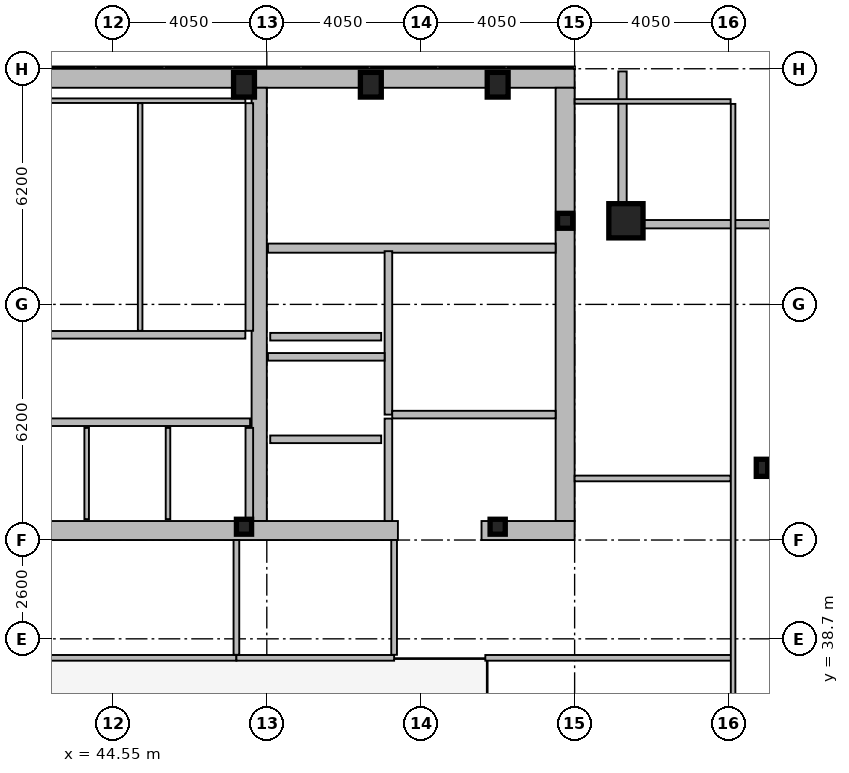
"""IFC4 building model, lengths in metres.
Left out: names, types, materials, properties, quantities, classifications, styles, units other than length and angle.
Written with IfcOpenShell. Run it as: python <this file> out.ifc"""

import sys

from ifc_helpers import new_model, si_unit, direction, frame, frame_2d, origin, origin_2d, place, context, subcontext, project, spatial, rectangle, hollow_rectangle, i_section, extrude, element, fill, save


model = new_model("IFC4")
c1 = context("Model", 3, precision=1e-05, world=origin(), true_north=direction((0.0, 1.0)))
c2 = subcontext(c1, "Body", "Model", "MODEL_VIEW")
j1 = project(units=[si_unit("LENGTHUNIT", "METRE"), si_unit("PLANEANGLEUNIT", "RADIAN")], contexts=[c1])
p1 = place(None, origin())
s1 = spatial("IfcSite", under=j1, at=p1, CompositionType="ELEMENT")
p2 = place(p1, origin())
s2 = spatial("IfcBuilding", under=s1, at=p2, CompositionType="ELEMENT")
p3 = place(p2, frame((0.0, 0.0, 329.0)))
s3 = spatial("IfcBuildingStorey", under=s2, at=p3, CompositionType="ELEMENT", Elevation=329.0)
p4 = place(p3, frame((16.2, 53.45, 0.0), z_axis=(0.0, 0.0, 1.0), x_axis=(1.0, 0.0, 0.0)))
e1 = element("IfcWall", 1, at=p4, inside=s3, PredefinedType="SHEAR", context=c2, shape_type="SweptSolid", body=[
    extrude(rectangle(XDim=40.5, YDim=0.5, at=frame_2d((20.25, 0.0))), origin(), (0.0, 0.0, 1.0), 3.44),
])
p5 = place(p3, frame((56.45, 53.2, 0.0), z_axis=(0.0, 0.0, 1.0), x_axis=(0.0, -1.0, 0.0)))
e2 = element("IfcWall", 2, at=p5, inside=s3, PredefinedType="SHEAR", context=c2, shape_type="SweptSolid", body=[
    extrude(rectangle(XDim=11.4, YDim=0.5, at=frame_2d((5.7, 0.0))), origin(), (0.0, 0.0, 1.0), 3.44),
])
p6 = place(p3, frame((48.4, 41.8, 0.0), z_axis=(0.0, 0.0, 1.0), x_axis=(0.0, 1.0, 0.0)))
e3 = element("IfcWall", 3, at=p6, inside=s3, PredefinedType="SHEAR", context=c2, shape_type="SweptSolid", body=[
    extrude(rectangle(XDim=11.4, YDim=0.4, at=frame_2d((5.7, 0.0))), origin(), (0.0, 0.0, 1.0), 3.44),
])
p7 = place(p3, frame((52.05, 41.55, 0.0), z_axis=(0.0, 0.0, 1.0), x_axis=(-1.0, 0.0, 0.0)))
e4 = element("IfcWall", 4, at=p7, inside=s3, PredefinedType="SHEAR", context=c2, shape_type="SweptSolid", body=[
    extrude(rectangle(XDim=11.3, YDim=0.5, at=frame_2d((5.65, 0.0))), origin(), (0.0, 0.0, 1.0), 3.44),
])
p8 = place(p3, frame((56.7, 41.55, 0.0), z_axis=(0.0, 0.0, 1.0), x_axis=(-1.0, 0.0, 0.0)))
e5 = element("IfcWall", 5, at=p8, inside=s3, PredefinedType="SHEAR", context=c2, shape_type="SweptSolid", body=[
    extrude(rectangle(XDim=2.45, YDim=0.5, at=frame_2d((1.225, 0.0))), origin(), (0.0, 0.0, 1.0), 3.44),
])
p9 = place(p3, frame((48.63, 48.98, 0.0), z_axis=(0.0, 0.0, 1.0), x_axis=(1.0, 0.0, 0.0)))
e6 = element("IfcWall", 6, at=p9, inside=s3, PredefinedType="SHEAR", context=c2, shape_type="SweptSolid", body=[
    extrude(rectangle(XDim=7.57, YDim=0.24, at=frame_2d((3.785, 0.0))), origin(), (0.0, 0.0, 1.0), 3.44),
])
p10 = place(p9, frame((6.3, 0.0, 0.0)))
e7 = element("IfcOpeningElement", 7, at=p10, cuts=e6, PredefinedType="OPENING", context=c2, shape_type="SweptSolid", body=[
    extrude(rectangle(XDim=1.05, YDim=2.15, at=frame_2d((0.525, 1.075))), frame((0.0, 0.13, 0.0), z_axis=(0.0, -1.0, 0.0), x_axis=(1.0, 0.0, 0.0)), (0.0, 0.0, 1.0), 0.26),
])
p11 = place(p3, frame((58.05, 49.7, 0.0), z_axis=(0.0, 0.0, 1.0), x_axis=(1.0, 0.0, 0.0)))
e8 = element("IfcColumn", 8, at=p11, inside=s3, PredefinedType="COLUMN", context=c2, shape_type="SweptSolid", body=[
    extrude(hollow_rectangle(XDim=0.9, YDim=0.9, WallThickness=0.05, at=origin_2d()), origin(), (0.0, 0.0, 1.0), 3.6),
])
for number, where, z_axis, x_axis in (
    (9, (48.0, 53.28, 0.0), (0.0, 0.0, 1.0), (1.0, 0.0, 0.0)),
    (10, (51.337, 53.28, 0.0), (0.0, 0.0, 1.0), (1.0, 0.0, 0.0)),
    (11, (54.675, 53.28, 0.0), (0.0, 0.0, 1.0), (1.0, 0.0, 0.0)),
):
    element("IfcColumn", number, at=place(p3, frame(where, z_axis=z_axis, x_axis=x_axis)), inside=s3, PredefinedType="COLUMN", context=c2, shape_type="SweptSolid", body=[
        extrude(hollow_rectangle(XDim=0.55, YDim=0.65, WallThickness=0.04, at=origin_2d()), origin(), (0.0, 0.0, 1.0), 3.6),
    ])
p12 = place(p3, frame((61.63, 43.2, 0.0), z_axis=(0.0, 0.0, 1.0), x_axis=(1.0, 0.0, 0.0)))
e12 = element("IfcColumn", 12, at=p12, inside=s3, PredefinedType="COLUMN", context=c2, shape_type="SweptSolid", body=[
    extrude(i_section(OverallWidth=0.3, OverallDepth=0.45, WebThickness=0.014, FlangeThickness=0.026, at=origin_2d()), origin(), (0.0, 0.0, 1.0), 3.6),
])
for number, where, z_axis, x_axis in (
    (13, (56.45, 49.7, 0.0), (0.0, 0.0, 1.0), (1.0, 0.0, 0.0)),
    (14, (48.0, 41.65, 0.0), (0.0, 0.0, 1.0), (1.0, 0.0, 0.0)),
    (15, (54.675, 41.65, 0.0), (0.0, 0.0, 1.0), (1.0, 0.0, 0.0)),
):
    element("IfcColumn", number, at=place(p3, frame(where, z_axis=z_axis, x_axis=x_axis)), inside=s3, PredefinedType="COLUMN", context=c2, shape_type="SweptSolid", body=[
        extrude(i_section(OverallWidth=0.399, OverallDepth=0.393, WebThickness=0.023, FlangeThickness=0.037, at=origin_2d()), origin(), (0.0, 0.0, 1.0), 3.6),
    ])
p13 = place(p3, frame((57.96, 53.63, 0.0), z_axis=(0.0, 0.0, 1.0), x_axis=(0.0, -1.0, 0.0)))
e16 = element("IfcWall", 16, at=p13, inside=s3, PredefinedType="SOLIDWALL", context=c2, shape_type="SweptSolid", body=[
    extrude(rectangle(XDim=3.91, YDim=0.22, at=frame_2d((1.955, 0.0))), origin(), (0.0, 0.0, 1.0), 2.88),
])
p14 = place(p3, frame((57.85, 49.61, 0.0), z_axis=(0.0, 0.0, 1.0), x_axis=(1.0, 0.0, 0.0)))
e17 = element("IfcWall", 17, at=p14, inside=s3, PredefinedType="SOLIDWALL", context=c2, shape_type="SweptSolid", body=[
    extrude(rectangle(XDim=4.22, YDim=0.22, at=frame_2d((2.11, 0.0))), origin(), (0.0, 0.0, 1.0), 2.88),
])
p15 = place(p3, frame((41.68, 44.4, 0.0), z_axis=(0.0, 0.0, 1.0), x_axis=(1.0, 0.0, 0.0)))
e18 = element("IfcWall", 18, at=p15, inside=s3, PredefinedType="PARTITIONING", context=c2, shape_type="SweptSolid", body=[
    extrude(rectangle(XDim=6.48, YDim=0.2, at=frame_2d((3.24, 0.0))), origin(), (0.0, 0.0, 1.0), 3.44),
])
p16 = place(p15, frame((0.58, 0.0, 0.0)))
e19 = element("IfcOpeningElement", 19, at=p16, cuts=e18, PredefinedType="OPENING", context=c2, shape_type="SweptSolid", body=[
    extrude(rectangle(XDim=1.1, YDim=2.18, at=frame_2d((0.55, 1.09))), frame((0.0, 0.11, 0.0), z_axis=(0.0, -1.0, 0.0), x_axis=(1.0, 0.0, 0.0)), (0.0, 0.0, 1.0), 0.22),
])
p17 = place(p15, frame((2.74, 0.0, 0.0)))
e20 = element("IfcOpeningElement", 20, at=p17, cuts=e18, PredefinedType="OPENING", context=c2, shape_type="SweptSolid", body=[
    extrude(rectangle(XDim=1.1, YDim=2.18, at=frame_2d((0.55, 1.09))), frame((0.0, 0.11, 0.0), z_axis=(0.0, -1.0, 0.0), x_axis=(1.0, 0.0, 0.0)), (0.0, 0.0, 1.0), 0.22),
])
p18 = place(p15, frame((4.9, 0.0, 0.0)))
e21 = element("IfcOpeningElement", 21, at=p18, cuts=e18, PredefinedType="OPENING", context=c2, shape_type="SweptSolid", body=[
    extrude(rectangle(XDim=1.1, YDim=2.18, at=frame_2d((0.55, 1.09))), frame((0.0, 0.11, 0.0), z_axis=(0.0, -1.0, 0.0), x_axis=(1.0, 0.0, 0.0)), (0.0, 0.0, 1.0), 0.22),
])
p19 = place(p3, frame((51.61, 43.95, 0.0), z_axis=(0.0, 0.0, 1.0), x_axis=(-1.0, 0.0, 0.0)))
e22 = element("IfcWall", 22, at=p19, inside=s3, PredefinedType="PARTITIONING", context=c2, shape_type="SweptSolid", body=[
    extrude(rectangle(XDim=2.92, YDim=0.2, at=frame_2d((1.46, 0.0))), origin(), (0.0, 0.0, 1.0), 3.44),
])
p20 = place(p19, frame((0.81, 0.0, 0.0)))
e23 = element("IfcOpeningElement", 23, at=p20, cuts=e22, PredefinedType="OPENING", context=c2, shape_type="SweptSolid", body=[
    extrude(rectangle(XDim=1.3, YDim=2.18, at=frame_2d((0.65, 1.09))), frame((0.0, 0.11, 0.0), z_axis=(0.0, -1.0, 0.0), x_axis=(1.0, 0.0, 0.0)), (0.0, 0.0, 1.0), 0.22),
])
p21 = place(p3, frame((51.61, 46.65, 0.0), z_axis=(0.0, 0.0, 1.0), x_axis=(-1.0, 0.0, 0.0)))
e24 = element("IfcWall", 24, at=p21, inside=s3, PredefinedType="PARTITIONING", context=c2, shape_type="SweptSolid", body=[
    extrude(rectangle(XDim=2.92, YDim=0.2, at=frame_2d((1.46, 0.0))), origin(), (0.0, 0.0, 1.0), 3.44),
])
p22 = place(p21, frame((0.86, 0.0, 0.0)))
e25 = element("IfcOpeningElement", 25, at=p22, cuts=e24, PredefinedType="OPENING", context=c2, shape_type="SweptSolid", body=[
    extrude(rectangle(XDim=1.2, YDim=2.18, at=frame_2d((0.6, 1.09))), frame((0.0, 0.11, 0.0), z_axis=(0.0, -1.0, 0.0), x_axis=(1.0, 0.0, 0.0)), (0.0, 0.0, 1.0), 0.22),
])
p23 = place(p3, frame((51.8, 44.6, 0.0), z_axis=(0.0, 0.0, 1.0), x_axis=(0.0, 1.0, 0.0)))
e26 = element("IfcWall", 26, at=p23, inside=s3, PredefinedType="PARTITIONING", context=c2, shape_type="SweptSolid", body=[
    extrude(rectangle(XDim=4.3, YDim=0.2, at=frame_2d((2.15, 0.0))), origin(), (0.0, 0.0, 1.0), 3.44),
])
p24 = place(p3, frame((51.9, 44.6, 0.0), z_axis=(0.0, 0.0, 1.0), x_axis=(1.0, 0.0, 0.0)))
e27 = element("IfcWall", 27, at=p24, inside=s3, PredefinedType="PARTITIONING", context=c2, shape_type="SweptSolid", body=[
    extrude(rectangle(XDim=4.3, YDim=0.2, at=frame_2d((2.15, 0.0))), origin(), (0.0, 0.0, 1.0), 3.44),
])
p25 = place(p24, frame((1.15, 0.0, 0.0)))
e28 = element("IfcOpeningElement", 28, at=p25, cuts=e27, PredefinedType="OPENING", context=c2, shape_type="SweptSolid", body=[
    extrude(rectangle(XDim=1.05, YDim=2.15, at=frame_2d((0.525, 1.075))), frame((0.0, 0.11, 0.0), z_axis=(0.0, -1.0, 0.0), x_axis=(1.0, 0.0, 0.0)), (0.0, 0.0, 1.0), 0.22),
])
p26 = place(p3, frame((48.63, 46.12, 0.0), z_axis=(0.0, 0.0, 1.0), x_axis=(1.0, 0.0, 0.0)))
e29 = element("IfcWall", 29, at=p26, inside=s3, PredefinedType="PARTITIONING", context=c2, shape_type="SweptSolid", body=[
    extrude(rectangle(XDim=3.07, YDim=0.2, at=frame_2d((1.535, 0.0))), origin(), (0.0, 0.0, 1.0), 3.44),
])
p27 = place(p3, frame((51.8, 41.8, 0.0), z_axis=(0.0, 0.0, 1.0), x_axis=(0.0, 1.0, 0.0)))
e30 = element("IfcWall", 30, at=p27, inside=s3, PredefinedType="PARTITIONING", context=c2, shape_type="SweptSolid", body=[
    extrude(rectangle(XDim=2.695, YDim=0.2, at=frame_2d((1.348, 0.0))), origin(), (0.0, 0.0, 1.0), 3.44),
])
p28 = place(p27, frame((0.38, 0.0, 0.0)))
e31 = element("IfcOpeningElement", 31, at=p28, cuts=e30, PredefinedType="OPENING", context=c2, shape_type="SweptSolid", body=[
    extrude(rectangle(XDim=1.05, YDim=2.15, at=frame_2d((0.525, 1.075))), frame((0.0, 0.11, 0.0), z_axis=(0.0, -1.0, 0.0), x_axis=(1.0, 0.0, 0.0)), (0.0, 0.0, 1.0), 0.22),
])
p29 = place(p3, frame((48.14, 46.805, 0.0), z_axis=(0.0, 0.0, 1.0), x_axis=(0.0, 1.0, 0.0)))
e32 = element("IfcWall", 32, at=p29, inside=s3, PredefinedType="PARTITIONING", context=c2, shape_type="SweptSolid", body=[
    extrude(rectangle(XDim=5.99, YDim=0.2, at=frame_2d((2.995, 0.0))), origin(), (0.0, 0.0, 1.0), 3.44),
])
p30 = place(p3, frame((40.685, 52.86, 0.0), z_axis=(0.0, 0.0, 1.0), x_axis=(1.0, 0.0, 0.0)))
e33 = element("IfcWall", 33, at=p30, inside=s3, PredefinedType="PARTITIONING", context=c2, shape_type="SweptSolid", body=[
    extrude(rectangle(XDim=7.35, YDim=0.12, at=frame_2d((3.675, 0.0))), origin(), (0.0, 0.0, 1.0), 3.44),
])
p31 = place(p3, frame((45.267, 46.805, 0.0), z_axis=(0.0, 0.0, 1.0), x_axis=(0.0, 1.0, 0.0)))
e34 = element("IfcWall", 34, at=p31, inside=s3, PredefinedType="PARTITIONING", context=c2, shape_type="SweptSolid", body=[
    extrude(rectangle(XDim=5.99, YDim=0.12, at=frame_2d((2.995, 0.0))), origin(), (0.0, 0.0, 1.0), 3.44),
])
p32 = place(p3, frame((40.685, 46.7, 0.0), z_axis=(0.0, 0.0, 1.0), x_axis=(1.0, 0.0, 0.0)))
e35 = element("IfcWall", 35, at=p32, inside=s3, PredefinedType="PARTITIONING", context=c2, shape_type="SweptSolid", body=[
    extrude(rectangle(XDim=7.35, YDim=0.2, at=frame_2d((3.675, 0.0))), origin(), (0.0, 0.0, 1.0), 3.44),
])
p33 = place(p32, frame((1.15, 0.0, 0.0)))
e36 = element("IfcOpeningElement", 36, at=p33, cuts=e35, PredefinedType="OPENING", context=c2, shape_type="SweptSolid", body=[
    extrude(rectangle(XDim=0.95, YDim=2.1, at=frame_2d((0.475, 1.05))), frame((0.0, 0.11, 0.0), z_axis=(0.0, -1.0, 0.0), x_axis=(1.0, 0.0, 0.0)), (0.0, 0.0, 1.0), 0.22),
])
p34 = place(p32, frame((5.237, 0.0, 0.0)))
e37 = element("IfcOpeningElement", 37, at=p34, cuts=e35, PredefinedType="OPENING", context=c2, shape_type="SweptSolid", body=[
    extrude(rectangle(XDim=0.95, YDim=2.1, at=frame_2d((0.475, 1.05))), frame((0.0, 0.11, 0.0), z_axis=(0.0, -1.0, 0.0), x_axis=(1.0, 0.0, 0.0)), (0.0, 0.0, 1.0), 0.22),
])
p35 = place(p3, frame((48.14, 41.85, 0.0), z_axis=(0.0, 0.0, 1.0), x_axis=(0.0, 1.0, 0.0)))
e38 = element("IfcWall", 38, at=p35, inside=s3, PredefinedType="PARTITIONING", context=c2, shape_type="SweptSolid", body=[
    extrude(rectangle(XDim=2.4, YDim=0.2, at=frame_2d((1.2, 0.0))), origin(), (0.0, 0.0, 1.0), 3.44),
])
for number, where, z_axis, x_axis in (
    (39, (43.86, 41.85, 0.0), (0.0, 0.0, 1.0), (0.0, 1.0, 0.0)),
    (40, (46.0, 41.85, 0.0), (0.0, 0.0, 1.0), (0.0, 1.0, 0.0)),
):
    element("IfcWall", number, at=place(p3, frame(where, z_axis=z_axis, x_axis=x_axis)), inside=s3, PredefinedType="PARTITIONING", context=c2, shape_type="SweptSolid", body=[
        extrude(rectangle(XDim=2.4, YDim=0.12, at=frame_2d((1.2, 0.0))), origin(), (0.0, 0.0, 1.0), 3.44),
    ])
p36 = place(p3, frame((40.88, 38.2, 0.0), z_axis=(0.0, 0.0, 1.0), x_axis=(1.0, 0.0, 0.0)))
e41 = element("IfcWall", 41, at=p36, inside=s3, PredefinedType="PARTITIONING", context=c2, shape_type="SweptSolid", body=[
    extrude(rectangle(XDim=6.92, YDim=0.15, at=frame_2d((3.46, 0.0))), origin(), (0.0, 0.0, 1.0), 2.83),
])
p37 = place(p36, frame((1.1, 0.0, 0.0)))
e42 = element("IfcOpeningElement", 42, at=p37, cuts=e41, PredefinedType="OPENING", context=c2, shape_type="SweptSolid", body=[
    extrude(rectangle(XDim=0.9, YDim=2.05, at=frame_2d((0.45, 1.025))), frame((0.0, 0.085, 0.0), z_axis=(0.0, -1.0, 0.0), x_axis=(1.0, 0.0, 0.0)), (0.0, 0.0, 1.0), 0.17),
])
p38 = place(p3, frame((47.8, 38.2, 0.0), z_axis=(0.0, 0.0, 1.0), x_axis=(1.0, 0.0, 0.0)))
e43 = element("IfcWall", 43, at=p38, inside=s3, PredefinedType="PARTITIONING", context=c2, shape_type="SweptSolid", body=[
    extrude(rectangle(XDim=4.15, YDim=0.15, at=frame_2d((2.075, 0.0))), origin(), (0.0, 0.0, 1.0), 2.83),
])
p39 = place(p38, frame((1.1, 0.0, 0.0)))
e44 = element("IfcOpeningElement", 44, at=p39, cuts=e43, PredefinedType="OPENING", context=c2, shape_type="SweptSolid", body=[
    extrude(rectangle(XDim=1.0, YDim=2.05, at=frame_2d((0.5, 1.025))), frame((0.0, 0.085, 0.0), z_axis=(0.0, -1.0, 0.0), x_axis=(1.0, 0.0, 0.0)), (0.0, 0.0, 1.0), 0.17),
])
p40 = place(p3, frame((47.8, 38.28, 0.0), z_axis=(0.0, 0.0, 1.0), x_axis=(0.0, 1.0, 0.0)))
e45 = element("IfcWall", 45, at=p40, inside=s3, PredefinedType="PARTITIONING", context=c2, shape_type="SweptSolid", body=[
    extrude(rectangle(XDim=3.02, YDim=0.15, at=frame_2d((1.51, 0.0))), origin(), (0.0, 0.0, 1.0), 2.83),
])
p41 = place(p3, frame((51.95, 38.28, 0.0), z_axis=(0.0, 0.0, 1.0), x_axis=(0.0, 1.0, 0.0)))
e46 = element("IfcWall", 46, at=p41, inside=s3, PredefinedType="PARTITIONING", context=c2, shape_type="SweptSolid", body=[
    extrude(rectangle(XDim=3.02, YDim=0.15, at=frame_2d((1.51, 0.0))), origin(), (0.0, 0.0, 1.0), 3.44),
])
p42 = place(p3, frame((54.35, 38.2, 0.0), z_axis=(0.0, 0.0, 1.0), x_axis=(1.0, 0.0, 0.0)))
e47 = element("IfcWall", 47, at=p42, inside=s3, PredefinedType="PARTITIONING", context=c2, shape_type="SweptSolid", body=[
    extrude(rectangle(XDim=6.52, YDim=0.15, at=frame_2d((3.26, 0.0))), origin(), (0.0, 0.0, 1.0), 2.83),
])
p43 = place(p42, frame((3.25, 0.0, 0.0)))
e48 = element("IfcOpeningElement", 48, at=p43, cuts=e47, PredefinedType="OPENING", context=c2, shape_type="SweptSolid", body=[
    extrude(rectangle(XDim=0.95, YDim=2.05, at=frame_2d((0.475, 1.025))), frame((0.0, 0.085, 0.0), z_axis=(0.0, -1.0, 0.0), x_axis=(1.0, 0.0, 0.0)), (0.0, 0.0, 1.0), 0.17),
])
p44 = place(p3, frame((56.7, 42.92, 0.0), z_axis=(0.0, 0.0, 1.0), x_axis=(1.0, 0.0, 0.0)))
e49 = element("IfcWall", 49, at=p44, inside=s3, PredefinedType="PARTITIONING", context=c2, shape_type="SweptSolid", body=[
    extrude(rectangle(XDim=4.105, YDim=0.15, at=frame_2d((2.052, 0.0))), origin(), (0.0, 0.0, 1.0), 2.83),
])
p45 = place(p44, frame((0.9, 0.0, 0.0)))
e50 = element("IfcOpeningElement", 50, at=p45, cuts=e49, PredefinedType="OPENING", context=c2, shape_type="SweptSolid", body=[
    extrude(rectangle(XDim=0.9, YDim=2.05, at=frame_2d((0.45, 1.025))), frame((0.0, 0.085, 0.0), z_axis=(0.0, -1.0, 0.0), x_axis=(1.0, 0.0, 0.0)), (0.0, 0.0, 1.0), 0.17),
])
p46 = place(p3, frame((60.87, 10.665, 0.0), z_axis=(0.0, 0.0, 1.0), x_axis=(0.0, 1.0, 0.0)))
e51 = element("IfcWall", 51, at=p46, inside=s3, PredefinedType="PARTITIONING", context=c2, shape_type="SweptSolid", body=[
    extrude(rectangle(XDim=42.11, YDim=0.12, at=frame_2d((21.055, 0.0))), origin(), (0.0, 0.0, 1.0), 2.83),
])
p47 = place(p3, frame((56.7, 52.84, 0.0), z_axis=(0.0, 0.0, 1.0), x_axis=(1.0, 0.0, 0.0)))
e52 = element("IfcWall", 52, at=p47, inside=s3, PredefinedType="PARTITIONING", context=c2, shape_type="SweptSolid", body=[
    extrude(rectangle(XDim=4.105, YDim=0.12, at=frame_2d((2.052, 0.0))), origin(), (0.0, 0.0, 1.0), 3.44),
])
p48 = place(p10, origin())
e53 = element("IfcDoor", 53, at=p48, inside=s3, OperationType="SINGLE_SWING_RIGHT", PredefinedType="DOOR", context=c2, shape_type="SweptSolid", body=[
    extrude(rectangle(XDim=1.05, YDim=2.15, at=frame_2d((0.525, 1.075))), frame((0.0, 0.025, 0.0), z_axis=(0.0, -1.0, 0.0), x_axis=(1.0, 0.0, 0.0)), (0.0, 0.0, 1.0), 0.05),
])
fill(e7, e53)
p49 = place(p16, origin())
e54 = element("IfcDoor", 54, at=p49, inside=s3, OperationType="SLIDING_TO_LEFT", PredefinedType="DOOR", context=c2, shape_type="SweptSolid", body=[
    extrude(rectangle(XDim=1.1, YDim=2.18, at=frame_2d((0.55, 1.09))), frame((0.0, 0.025, 0.0), z_axis=(0.0, -1.0, 0.0), x_axis=(1.0, 0.0, 0.0)), (0.0, 0.0, 1.0), 0.05),
])
fill(e19, e54)
p50 = place(p17, origin())
e55 = element("IfcDoor", 55, at=p50, inside=s3, OperationType="SLIDING_TO_LEFT", PredefinedType="DOOR", context=c2, shape_type="SweptSolid", body=[
    extrude(rectangle(XDim=1.1, YDim=2.18, at=frame_2d((0.55, 1.09))), frame((0.0, 0.025, 0.0), z_axis=(0.0, -1.0, 0.0), x_axis=(1.0, 0.0, 0.0)), (0.0, 0.0, 1.0), 0.05),
])
fill(e20, e55)
p51 = place(p18, origin())
e56 = element("IfcDoor", 56, at=p51, inside=s3, OperationType="SLIDING_TO_LEFT", PredefinedType="DOOR", context=c2, shape_type="SweptSolid", body=[
    extrude(rectangle(XDim=1.1, YDim=2.18, at=frame_2d((0.55, 1.09))), frame((0.0, 0.025, 0.0), z_axis=(0.0, -1.0, 0.0), x_axis=(1.0, 0.0, 0.0)), (0.0, 0.0, 1.0), 0.05),
])
fill(e21, e56)
p52 = place(p20, origin())
e57 = element("IfcDoor", 57, at=p52, inside=s3, OperationType="SLIDING_TO_LEFT", PredefinedType="DOOR", context=c2, shape_type="SweptSolid", body=[
    extrude(rectangle(XDim=1.3, YDim=2.18, at=frame_2d((0.65, 1.09))), frame((0.0, 0.025, 0.0), z_axis=(0.0, -1.0, 0.0), x_axis=(1.0, 0.0, 0.0)), (0.0, 0.0, 1.0), 0.05),
])
fill(e23, e57)
p53 = place(p22, origin())
e58 = element("IfcDoor", 58, at=p53, inside=s3, OperationType="SLIDING_TO_LEFT", PredefinedType="DOOR", context=c2, shape_type="SweptSolid", body=[
    extrude(rectangle(XDim=1.2, YDim=2.18, at=frame_2d((0.6, 1.09))), frame((0.0, 0.025, 0.0), z_axis=(0.0, -1.0, 0.0), x_axis=(1.0, 0.0, 0.0)), (0.0, 0.0, 1.0), 0.05),
])
fill(e25, e58)
p54 = place(p25, origin())
e59 = element("IfcDoor", 59, at=p54, inside=s3, OperationType="SINGLE_SWING_RIGHT", PredefinedType="DOOR", context=c2, shape_type="SweptSolid", body=[
    extrude(rectangle(XDim=1.05, YDim=2.15, at=frame_2d((0.525, 1.075))), frame((0.0, 0.025, 0.0), z_axis=(0.0, -1.0, 0.0), x_axis=(1.0, 0.0, 0.0)), (0.0, 0.0, 1.0), 0.05),
])
fill(e28, e59)
p55 = place(p28, origin())
e60 = element("IfcDoor", 60, at=p55, inside=s3, OperationType="SINGLE_SWING_LEFT", PredefinedType="DOOR", context=c2, shape_type="SweptSolid", body=[
    extrude(rectangle(XDim=1.05, YDim=2.15, at=frame_2d((0.525, 1.075))), frame((0.0, 0.025, 0.0), z_axis=(0.0, -1.0, 0.0), x_axis=(1.0, 0.0, 0.0)), (0.0, 0.0, 1.0), 0.05),
])
fill(e31, e60)
p56 = place(p34, origin())
e61 = element("IfcDoor", 61, at=p56, inside=s3, OperationType="SINGLE_SWING_LEFT", PredefinedType="DOOR", context=c2, shape_type="SweptSolid", body=[
    extrude(rectangle(XDim=0.95, YDim=2.1, at=frame_2d((0.475, 1.05))), frame((0.0, 0.025, 0.0), z_axis=(0.0, -1.0, 0.0), x_axis=(1.0, 0.0, 0.0)), (0.0, 0.0, 1.0), 0.05),
])
fill(e37, e61)
p57 = place(p39, origin())
e62 = element("IfcDoor", 62, at=p57, inside=s3, OperationType="SINGLE_SWING_RIGHT", PredefinedType="DOOR", context=c2, shape_type="SweptSolid", body=[
    extrude(rectangle(XDim=1.0, YDim=2.05, at=frame_2d((0.5, 1.025))), frame((0.0, 0.025, 0.0), z_axis=(0.0, -1.0, 0.0), x_axis=(1.0, 0.0, 0.0)), (0.0, 0.0, 1.0), 0.05),
])
fill(e44, e62)
p58 = place(p43, origin())
e63 = element("IfcDoor", 63, at=p58, inside=s3, OperationType="SINGLE_SWING_RIGHT", PredefinedType="DOOR", context=c2, shape_type="SweptSolid", body=[
    extrude(rectangle(XDim=0.95, YDim=2.05, at=frame_2d((0.475, 1.025))), frame((0.0, 0.025, 0.0), z_axis=(0.0, -1.0, 0.0), x_axis=(1.0, 0.0, 0.0)), (0.0, 0.0, 1.0), 0.05),
])
fill(e48, e63)
p59 = place(p45, origin())
e64 = element("IfcDoor", 64, at=p59, inside=s3, OperationType="SINGLE_SWING_RIGHT", PredefinedType="DOOR", context=c2, shape_type="SweptSolid", body=[
    extrude(rectangle(XDim=0.9, YDim=2.05, at=frame_2d((0.45, 1.025))), frame((0.0, 0.025, 0.0), z_axis=(0.0, -1.0, 0.0), x_axis=(1.0, 0.0, 0.0)), (0.0, 0.0, 1.0), 0.05),
])
fill(e50, e64)
save(model, sys.argv[1])
